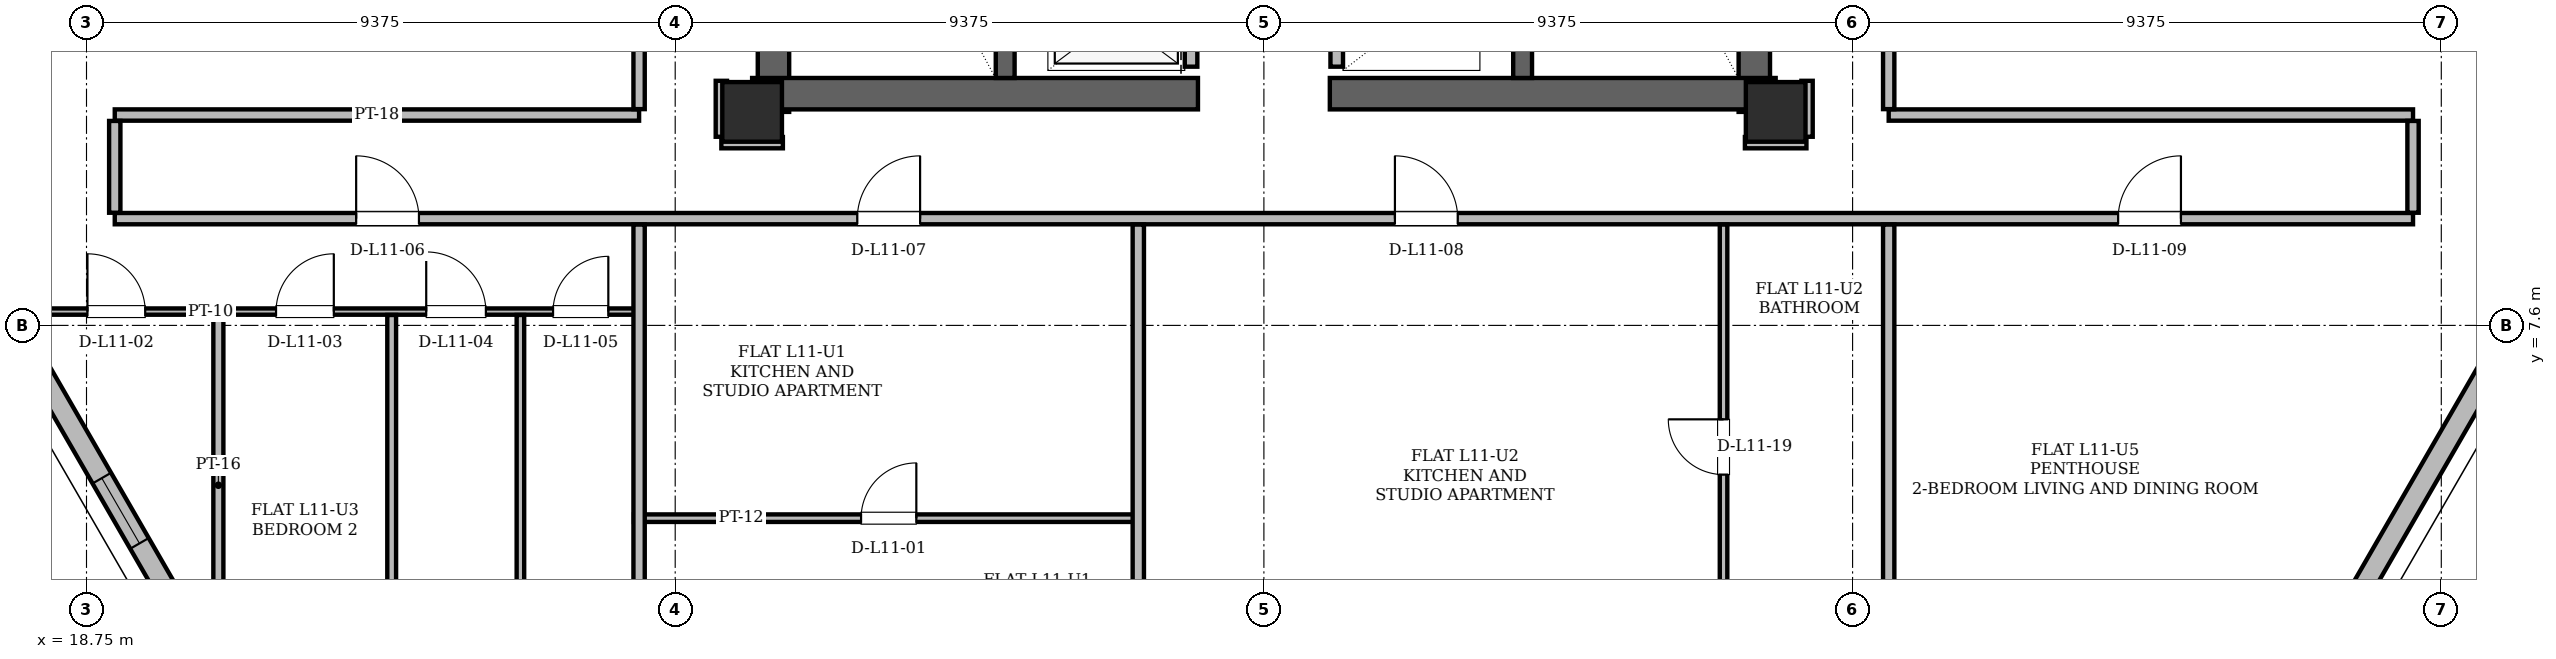
"""IFC4 building model, lengths in metres.
Left out: names, types, materials, properties, quantities, classifications, styles, units other than length and angle.
Written with IfcOpenShell. Run it as: python <this file> out.ifc"""

import sys

from ifc_helpers import new_model, si_unit, direction, frame, frame_2d, origin, origin_2d, place, context, subcontext, project, spatial, rectangle, hollow_rectangle, extrude, element, fill, save


model = new_model("IFC4")
c1 = context("Model", 3, precision=1e-05, world=origin(), true_north=direction((0.0, 1.0)))
c2 = subcontext(c1, "Body", "Model", "MODEL_VIEW")
j1 = project(units=[si_unit("LENGTHUNIT", "METRE"), si_unit("PLANEANGLEUNIT", "RADIAN")], contexts=[c1])
p1 = place(None, origin())
s1 = spatial("IfcSite", under=j1, at=p1, CompositionType="ELEMENT")
p2 = place(p1, origin())
s2 = spatial("IfcBuilding", under=s1, at=p2, CompositionType="ELEMENT")
p3 = place(p2, frame((0.0, 0.0, 45.3)))
s3 = spatial("IfcBuildingStorey", under=s2, at=p3, CompositionType="ELEMENT", Elevation=45.3)
for number, where, z_axis, x_axis in (
    (1, (29.35, 11.0, 0.0), (0.0, 0.0, 1.0), (1.0, 0.0, 0.0)),
    (2, (45.65, 11.0, 0.0), (0.0, 0.0, 1.0), (1.0, 0.0, 0.0)),
):
    element("IfcColumn", number, at=place(p3, frame(where, z_axis=z_axis, x_axis=x_axis)), inside=s3, PredefinedType="COLUMN", context=c2, shape_type="SweptSolid", body=[
        extrude(hollow_rectangle(XDim=0.95, YDim=0.95, WallThickness=0.08, at=origin_2d()), origin(), (0.0, 0.0, 1.0), 3.6),
    ])
for number, where, z_axis, x_axis in (
    (3, (29.69, 11.0, 0.0), (0.0, 0.0, 1.0), (0.0, 1.0, 0.0)),
    (4, (45.31, 11.0, 0.0), (0.0, 0.0, 1.0), (0.0, 1.0, 0.0)),
):
    element("IfcWall", number, at=place(p3, frame(where, z_axis=z_axis, x_axis=x_axis)), inside=s3, PredefinedType="SHEAR", context=c2, shape_type="SweptSolid", body=[
        extrude(rectangle(XDim=13.3, YDim=0.5, at=frame_2d((6.65, 0.0))), origin(), (0.0, 0.0, 1.0), 3.36),
    ])
for number, where, z_axis, x_axis in (
    (5, (29.35, 11.29, 0.0), (0.0, 0.0, 1.0), (1.0, 0.0, 0.0)),
    (6, (38.55, 11.29, 0.0), (0.0, 0.0, 1.0), (1.0, 0.0, 0.0)),
):
    element("IfcWall", number, at=place(p3, frame(where, z_axis=z_axis, x_axis=x_axis)), inside=s3, PredefinedType="SHEAR", context=c2, shape_type="SweptSolid", body=[
        extrude(rectangle(XDim=7.1, YDim=0.5, at=frame_2d((3.55, 0.0))), origin(), (0.0, 0.0, 1.0), 3.36),
    ])
for number, where, z_axis, x_axis in (
    (7, (33.38, 11.54, 0.0), (0.0, 0.0, 1.0), (0.0, 1.0, 0.0)),
    (8, (41.62, 11.54, 0.0), (0.0, 0.0, 1.0), (0.0, 1.0, 0.0)),
):
    element("IfcWall", number, at=place(p3, frame(where, z_axis=z_axis, x_axis=x_axis)), inside=s3, PredefinedType="SHEAR", context=c2, shape_type="SweptSolid", body=[
        extrude(rectangle(XDim=7.62, YDim=0.3, at=frame_2d((3.81, 0.0))), origin(), (0.0, 0.0, 1.0), 3.36),
    ])
p4 = place(p3, frame((13.416, 14.829, 0.0), z_axis=(0.0, 0.0, 1.0), x_axis=(0.499989538455, -0.866031443676, 0.0)))
e9 = element("IfcWall", 9, at=p4, inside=s3, PredefinedType="SOLIDWALL", context=c2, shape_type="SweptSolid", body=[
    extrude(rectangle(XDim=14.955, YDim=0.34, at=frame_2d((7.478, 0.0))), origin(), (0.0, 0.0, 1.0), 2.494),
])
p5 = place(p4, frame((4.918, 0.0, 0.85)))
e10 = element("IfcOpeningElement", 10, at=p5, cuts=e9, PredefinedType="OPENING", context=c2, shape_type="SweptSolid", body=[
    extrude(rectangle(XDim=1.2, YDim=1.48, at=frame_2d((0.6, 0.74))), frame((0.0, 0.17, 0.0), z_axis=(0.0, -1.0, 0.0), x_axis=(1.0, 0.0, 0.0)), (0.0, 0.0, 1.0), 0.34),
])
p6 = place(p4, frame((11.156, 0.0, 0.85)))
e11 = element("IfcOpeningElement", 11, at=p6, cuts=e9, PredefinedType="OPENING", context=c2, shape_type="SweptSolid", body=[
    extrude(rectangle(XDim=1.2, YDim=1.48, at=frame_2d((0.6, 0.74))), frame((0.0, 0.17, 0.0), z_axis=(0.0, -1.0, 0.0), x_axis=(1.0, 0.0, 0.0)), (0.0, 0.0, 1.0), 0.34),
])
p7 = place(p3, frame((54.107, 1.878, 0.0), z_axis=(0.0, 0.0, 1.0), x_axis=(0.499989538455, 0.866031443676, 0.0)))
e12 = element("IfcWall", 12, at=p7, inside=s3, PredefinedType="SOLIDWALL", context=c2, shape_type="SweptSolid", body=[
    extrude(rectangle(XDim=14.955, YDim=0.34, at=frame_2d((7.478, 0.0))), origin(), (0.0, 0.0, 1.0), 2.494),
])
p8 = place(p3, frame((36.34, 11.72, 0.0), z_axis=(0.0, 0.0, 1.0), x_axis=(0.0, 1.0, 0.0)))
e13 = element("IfcWall", 13, at=p8, inside=s3, PredefinedType="PARTITIONING", context=c2, shape_type="SweptSolid", body=[
    extrude(rectangle(XDim=7.6, YDim=0.2, at=frame_2d((3.8, 0.0))), origin(), (0.0, 0.0, 1.0), 3.36),
])
p9 = place(p8, frame((0.255, 0.0, 0.0)))
e14 = element("IfcOpeningElement", 14, at=p9, cuts=e13, PredefinedType="OPENING", context=c2, shape_type="SweptSolid", body=[
    extrude(rectangle(XDim=1.05, YDim=2.15, at=frame_2d((0.525, 1.075))), frame((0.0, 0.1, 0.0), z_axis=(0.0, -1.0, 0.0), x_axis=(1.0, 0.0, 0.0)), (0.0, 0.0, 1.0), 0.2),
])
p10 = place(p8, frame((2.105, 0.0, 0.0)))
e15 = element("IfcOpeningElement", 15, at=p10, cuts=e13, PredefinedType="OPENING", context=c2, shape_type="SweptSolid", body=[
    extrude(rectangle(XDim=1.05, YDim=2.15, at=frame_2d((0.525, 1.075))), frame((0.0, 0.1, 0.0), z_axis=(0.0, -1.0, 0.0), x_axis=(1.0, 0.0, 0.0)), (0.0, 0.0, 1.0), 0.2),
])
p11 = place(p8, frame((3.955, 0.0, 0.0)))
e16 = element("IfcOpeningElement", 16, at=p11, cuts=e13, PredefinedType="OPENING", context=c2, shape_type="SweptSolid", body=[
    extrude(rectangle(XDim=1.05, YDim=2.15, at=frame_2d((0.525, 1.075))), frame((0.0, 0.1, 0.0), z_axis=(0.0, -1.0, 0.0), x_axis=(1.0, 0.0, 0.0)), (0.0, 0.0, 1.0), 0.2),
])
p12 = place(p3, frame((38.66, 11.72, 0.0), z_axis=(0.0, 0.0, 1.0), x_axis=(0.0, 1.0, 0.0)))
e17 = element("IfcWall", 17, at=p12, inside=s3, PredefinedType="PARTITIONING", context=c2, shape_type="SweptSolid", body=[
    extrude(rectangle(XDim=9.1, YDim=0.2, at=frame_2d((4.55, 0.0))), origin(), (0.0, 0.0, 1.0), 3.36),
])
p13 = place(p3, frame((27.468, 4.53, 0.0), z_axis=(0.0, 0.0, 1.0), x_axis=(1.0, 0.0, 0.0)))
e18 = element("IfcWall", 18, at=p13, inside=s3, PredefinedType="PARTITIONING", context=c2, shape_type="SweptSolid", body=[
    extrude(rectangle(XDim=8.114, YDim=0.12, at=frame_2d((4.057, 0.0))), origin(), (0.0, 0.0, 1.0), 2.946),
])
p14 = place(p13, frame((3.617, 0.0, 0.0)))
e19 = element("IfcOpeningElement", 19, at=p14, cuts=e18, PredefinedType="OPENING", context=c2, shape_type="SweptSolid", body=[
    extrude(rectangle(XDim=0.88, YDim=2.08, at=frame_2d((0.44, 1.04))), frame((0.0, 0.06, 0.0), z_axis=(0.0, -1.0, 0.0), x_axis=(1.0, 0.0, 0.0)), (0.0, 0.0, 1.0), 0.12),
])
p15 = place(p3, frame((17.663, 7.82, 0.0), z_axis=(0.0, 0.0, 1.0), x_axis=(1.0, 0.0, 0.0)))
e20 = element("IfcWall", 20, at=p15, inside=s3, PredefinedType="PARTITIONING", context=c2, shape_type="SweptSolid", body=[
    extrude(rectangle(XDim=9.937, YDim=0.1, at=frame_2d((4.969, 0.0))), origin(), (0.0, 0.0, 1.0), 2.738),
])
p16 = place(p15, frame((1.102, 0.0, 0.0)))
e21 = element("IfcOpeningElement", 21, at=p16, cuts=e20, PredefinedType="OPENING", context=c2, shape_type="SweptSolid", body=[
    extrude(rectangle(XDim=0.92, YDim=2.12, at=frame_2d((0.46, 1.06))), frame((0.0, 0.05, 0.0), z_axis=(0.0, -1.0, 0.0), x_axis=(1.0, 0.0, 0.0)), (0.0, 0.0, 1.0), 0.1),
])
p17 = place(p15, frame((4.105, 0.0, 0.0)))
e22 = element("IfcOpeningElement", 22, at=p17, cuts=e20, PredefinedType="OPENING", context=c2, shape_type="SweptSolid", body=[
    extrude(rectangle(XDim=0.92, YDim=2.12, at=frame_2d((0.46, 1.06))), frame((0.0, 0.05, 0.0), z_axis=(0.0, -1.0, 0.0), x_axis=(1.0, 0.0, 0.0)), (0.0, 0.0, 1.0), 0.1),
])
p18 = place(p15, frame((6.497, 0.0, 0.0)))
e23 = element("IfcOpeningElement", 23, at=p18, cuts=e20, PredefinedType="OPENING", context=c2, shape_type="SweptSolid", body=[
    extrude(rectangle(XDim=0.95, YDim=2.1, at=frame_2d((0.475, 1.05))), frame((0.0, 0.05, 0.0), z_axis=(0.0, -1.0, 0.0), x_axis=(1.0, 0.0, 0.0)), (0.0, 0.0, 1.0), 0.1),
])
p19 = place(p15, frame((8.517, 0.0, 0.0)))
e24 = element("IfcOpeningElement", 24, at=p19, cuts=e20, PredefinedType="OPENING", context=c2, shape_type="SweptSolid", body=[
    extrude(rectangle(XDim=0.88, YDim=2.08, at=frame_2d((0.44, 1.04))), frame((0.0, 0.05, 0.0), z_axis=(0.0, -1.0, 0.0), x_axis=(1.0, 0.0, 0.0)), (0.0, 0.0, 1.0), 0.1),
])
p20 = place(p3, frame((19.2, 9.3, 0.0), z_axis=(0.0, 0.0, 1.0), x_axis=(1.0, 0.0, 0.0)))
e25 = element("IfcWall", 25, at=p20, inside=s3, PredefinedType="PARTITIONING", context=c2, shape_type="SweptSolid", body=[
    extrude(rectangle(XDim=36.6, YDim=0.18, at=frame_2d((18.3, 0.0))), origin(), (0.0, 0.0, 1.0), 2.738),
])
p21 = place(p20, frame((3.844, 0.0, 0.0)))
e26 = element("IfcOpeningElement", 26, at=p21, cuts=e25, PredefinedType="OPENING", context=c2, shape_type="SweptSolid", body=[
    extrude(rectangle(XDim=1.0, YDim=2.18, at=frame_2d((0.5, 1.09))), frame((0.0, 0.09, 0.0), z_axis=(0.0, -1.0, 0.0), x_axis=(1.0, 0.0, 0.0)), (0.0, 0.0, 1.0), 0.18),
])
p22 = place(p20, frame((11.825, 0.0, 0.0)))
e27 = element("IfcOpeningElement", 27, at=p22, cuts=e25, PredefinedType="OPENING", context=c2, shape_type="SweptSolid", body=[
    extrude(rectangle(XDim=1.0, YDim=2.18, at=frame_2d((0.5, 1.09))), frame((0.0, 0.09, 0.0), z_axis=(0.0, -1.0, 0.0), x_axis=(1.0, 0.0, 0.0)), (0.0, 0.0, 1.0), 0.18),
])
p23 = place(p20, frame((20.387, 0.0, 0.0)))
e28 = element("IfcOpeningElement", 28, at=p23, cuts=e25, PredefinedType="OPENING", context=c2, shape_type="SweptSolid", body=[
    extrude(rectangle(XDim=1.0, YDim=2.18, at=frame_2d((0.5, 1.09))), frame((0.0, 0.09, 0.0), z_axis=(0.0, -1.0, 0.0), x_axis=(1.0, 0.0, 0.0)), (0.0, 0.0, 1.0), 0.18),
])
p24 = place(p20, frame((31.904, 0.0, 0.0)))
e29 = element("IfcOpeningElement", 29, at=p24, cuts=e25, PredefinedType="OPENING", context=c2, shape_type="SweptSolid", body=[
    extrude(rectangle(XDim=1.0, YDim=2.18, at=frame_2d((0.5, 1.09))), frame((0.0, 0.09, 0.0), z_axis=(0.0, -1.0, 0.0), x_axis=(1.0, 0.0, 0.0)), (0.0, 0.0, 1.0), 0.18),
])
for number, where, z_axis, x_axis in (
    (30, (28.86, 10.51, 0.0), (0.0, 0.0, 1.0), (1.0, 0.0, 0.0)),
    (31, (45.16, 10.51, 0.0), (0.0, 0.0, 1.0), (1.0, 0.0, 0.0)),
):
    element("IfcWall", number, at=place(p3, frame(where, z_axis=z_axis, x_axis=x_axis)), inside=s3, PredefinedType="PARTITIONING", context=c2, shape_type="SweptSolid", body=[
        extrude(rectangle(XDim=0.98, YDim=0.18, at=frame_2d((0.49, 0.0))), origin(), (0.0, 0.0, 1.0), 2.738),
    ])
for number, where, z_axis, x_axis in (
    (32, (19.2, 10.95, 0.0), (0.0, 0.0, 1.0), (1.0, 0.0, 0.0)),
    (33, (47.45, 10.95, 0.0), (0.0, 0.0, 1.0), (1.0, 0.0, 0.0)),
):
    element("IfcWall", number, at=place(p3, frame(where, z_axis=z_axis, x_axis=x_axis)), inside=s3, PredefinedType="PARTITIONING", context=c2, shape_type="SweptSolid", body=[
        extrude(rectangle(XDim=8.35, YDim=0.18, at=frame_2d((4.175, 0.0))), origin(), (0.0, 0.0, 1.0), 3.36),
    ])
p25 = place(p3, frame((19.2, 9.394, 0.0), z_axis=(0.0, 0.0, 1.0), x_axis=(0.0, 1.0, 0.0)))
e34 = element("IfcWall", 34, at=p25, inside=s3, PredefinedType="PARTITIONING", context=c2, shape_type="SweptSolid", body=[
    extrude(rectangle(XDim=1.462, YDim=0.18, at=frame_2d((0.731, 0.0))), origin(), (0.0, 0.0, 1.0), 3.36),
])
p26 = place(p3, frame((20.85, 2.343, 0.0), z_axis=(0.0, 0.0, 1.0), x_axis=(0.0, 1.0, 0.0)))
e35 = element("IfcWall", 35, at=p26, inside=s3, PredefinedType="PARTITIONING", context=c2, shape_type="SweptSolid", body=[
    extrude(rectangle(XDim=5.423, YDim=0.16, at=frame_2d((2.711, 0.0))), origin(), (0.0, 0.0, 1.0), 3.36),
])
p27 = place(p3, frame((23.61, 2.052, 0.0), z_axis=(0.0, 0.0, 1.0), x_axis=(0.0, 1.0, 0.0)))
e36 = element("IfcWall", 36, at=p27, inside=s3, PredefinedType="PARTITIONING", context=c2, shape_type="SweptSolid", body=[
    extrude(rectangle(XDim=5.714, YDim=0.14, at=frame_2d((2.857, 0.0))), origin(), (0.0, 0.0, 1.0), 2.738),
])
p28 = place(p3, frame((25.66, 2.052, 0.0), z_axis=(0.0, 0.0, 1.0), x_axis=(0.0, 1.0, 0.0)))
e37 = element("IfcWall", 37, at=p28, inside=s3, PredefinedType="PARTITIONING", context=c2, shape_type="SweptSolid", body=[
    extrude(rectangle(XDim=5.714, YDim=0.12, at=frame_2d((2.857, 0.0))), origin(), (0.0, 0.0, 1.0), 2.738),
])
p29 = place(p3, frame((27.55, 2.052, 0.0), z_axis=(0.0, 0.0, 1.0), x_axis=(0.0, 1.0, 0.0)))
e38 = element("IfcWall", 38, at=p29, inside=s3, PredefinedType="PARTITIONING", context=c2, shape_type="SweptSolid", body=[
    extrude(rectangle(XDim=7.154, YDim=0.18, at=frame_2d((3.577, 0.0))), origin(), (0.0, 0.0, 1.0), 2.738),
])
p30 = place(p3, frame((27.55, 11.044, 0.0), z_axis=(0.0, 0.0, 1.0), x_axis=(0.0, 1.0, 0.0)))
e39 = element("IfcWall", 39, at=p30, inside=s3, PredefinedType="PARTITIONING", context=c2, shape_type="SweptSolid", body=[
    extrude(rectangle(XDim=27.715, YDim=0.18, at=frame_2d((13.858, 0.0))), origin(), (0.0, 0.0, 1.0), 2.738),
])
p31 = place(p30, frame((8.121, 0.0, 0.0)))
e40 = element("IfcOpeningElement", 40, at=p31, cuts=e39, PredefinedType="OPENING", context=c2, shape_type="SweptSolid", body=[
    extrude(rectangle(XDim=1.0, YDim=2.18, at=frame_2d((0.5, 1.09))), frame((0.0, 0.09, 0.0), z_axis=(0.0, -1.0, 0.0), x_axis=(1.0, 0.0, 0.0)), (0.0, 0.0, 1.0), 0.18),
])
p32 = place(p3, frame((28.86, 10.604, 0.0), z_axis=(0.0, 0.0, 1.0), x_axis=(0.0, 1.0, 0.0)))
e41 = element("IfcWall", 41, at=p32, inside=s3, PredefinedType="PARTITIONING", context=c2, shape_type="SweptSolid", body=[
    extrude(rectangle(XDim=0.891, YDim=0.18, at=frame_2d((0.446, 0.0))), origin(), (0.0, 0.0, 1.0), 2.738),
])
p33 = place(p3, frame((35.5, 2.052, 0.0), z_axis=(0.0, 0.0, 1.0), x_axis=(0.0, 1.0, 0.0)))
e42 = element("IfcWall", 42, at=p33, inside=s3, PredefinedType="PARTITIONING", context=c2, shape_type="SweptSolid", body=[
    extrude(rectangle(XDim=7.154, YDim=0.18, at=frame_2d((3.577, 0.0))), origin(), (0.0, 0.0, 1.0), 3.36),
])
p34 = place(p3, frame((44.82, 2.052, 0.0), z_axis=(0.0, 0.0, 1.0), x_axis=(0.0, 1.0, 0.0)))
e43 = element("IfcWall", 43, at=p34, inside=s3, PredefinedType="PARTITIONING", context=c2, shape_type="SweptSolid", body=[
    extrude(rectangle(XDim=7.154, YDim=0.12, at=frame_2d((3.577, 0.0))), origin(), (0.0, 0.0, 1.0), 2.946),
])
p35 = place(p34, frame((3.172, 0.0, 0.0)))
e44 = element("IfcOpeningElement", 44, at=p35, cuts=e43, PredefinedType="OPENING", context=c2, shape_type="SweptSolid", body=[
    extrude(rectangle(XDim=0.88, YDim=2.08, at=frame_2d((0.44, 1.04))), frame((0.0, 0.06, 0.0), z_axis=(0.0, -1.0, 0.0), x_axis=(1.0, 0.0, 0.0)), (0.0, 0.0, 1.0), 0.12),
])
p36 = place(p3, frame((46.15, 10.604, 0.0), z_axis=(0.0, 0.0, 1.0), x_axis=(0.0, 1.0, 0.0)))
e45 = element("IfcWall", 45, at=p36, inside=s3, PredefinedType="PARTITIONING", context=c2, shape_type="SweptSolid", body=[
    extrude(rectangle(XDim=0.891, YDim=0.18, at=frame_2d((0.446, 0.0))), origin(), (0.0, 0.0, 1.0), 2.738),
])
p37 = place(p3, frame((47.45, 2.052, 0.0), z_axis=(0.0, 0.0, 1.0), x_axis=(0.0, 1.0, 0.0)))
e46 = element("IfcWall", 46, at=p37, inside=s3, PredefinedType="PARTITIONING", context=c2, shape_type="SweptSolid", body=[
    extrude(rectangle(XDim=7.154, YDim=0.18, at=frame_2d((3.577, 0.0))), origin(), (0.0, 0.0, 1.0), 2.738),
])
p38 = place(p3, frame((47.45, 11.044, 0.0), z_axis=(0.0, 0.0, 1.0), x_axis=(0.0, 1.0, 0.0)))
e47 = element("IfcWall", 47, at=p38, inside=s3, PredefinedType="PARTITIONING", context=c2, shape_type="SweptSolid", body=[
    extrude(rectangle(XDim=27.715, YDim=0.18, at=frame_2d((13.858, 0.0))), origin(), (0.0, 0.0, 1.0), 2.738),
])
p39 = place(p38, frame((10.822, 0.0, 0.0)))
e48 = element("IfcOpeningElement", 48, at=p39, cuts=e47, PredefinedType="OPENING", context=c2, shape_type="SweptSolid", body=[
    extrude(rectangle(XDim=1.0, YDim=2.18, at=frame_2d((0.5, 1.09))), frame((0.0, 0.09, 0.0), z_axis=(0.0, -1.0, 0.0), x_axis=(1.0, 0.0, 0.0)), (0.0, 0.0, 1.0), 0.18),
])
p40 = place(p3, frame((55.8, 9.394, 0.0), z_axis=(0.0, 0.0, 1.0), x_axis=(0.0, 1.0, 0.0)))
e49 = element("IfcWall", 49, at=p40, inside=s3, PredefinedType="PARTITIONING", context=c2, shape_type="SweptSolid", body=[
    extrude(rectangle(XDim=1.462, YDim=0.18, at=frame_2d((0.731, 0.0))), origin(), (0.0, 0.0, 1.0), 3.36),
])
p41 = place(p6, origin())
e50 = element("IfcWindow", 50, at=p41, inside=s3, PartitioningType="SINGLE_PANEL", PredefinedType="WINDOW", context=c2, shape_type="SweptSolid", body=[
    extrude(rectangle(XDim=1.2, YDim=1.48, at=frame_2d((0.6, 0.74))), frame((0.0, 0.03, 0.0), z_axis=(0.0, -1.0, 0.0), x_axis=(1.0, 0.0, 0.0)), (0.0, 0.0, 1.0), 0.06),
])
fill(e11, e50)
p42 = place(p14, origin())
e51 = element("IfcDoor", 51, at=p42, inside=s3, OperationType="SINGLE_SWING_RIGHT", PredefinedType="DOOR", context=c2, shape_type="SweptSolid", body=[
    extrude(rectangle(XDim=0.88, YDim=2.08, at=frame_2d((0.44, 1.04))), frame((0.0, 0.025, 0.0), z_axis=(0.0, -1.0, 0.0), x_axis=(1.0, 0.0, 0.0)), (0.0, 0.0, 1.0), 0.05),
])
fill(e19, e51)
p43 = place(p16, origin())
e52 = element("IfcDoor", 52, at=p43, inside=s3, OperationType="SINGLE_SWING_LEFT", PredefinedType="DOOR", context=c2, shape_type="SweptSolid", body=[
    extrude(rectangle(XDim=0.92, YDim=2.12, at=frame_2d((0.46, 1.06))), frame((0.0, 0.025, 0.0), z_axis=(0.0, -1.0, 0.0), x_axis=(1.0, 0.0, 0.0)), (0.0, 0.0, 1.0), 0.05),
])
fill(e21, e52)
p44 = place(p17, origin())
e53 = element("IfcDoor", 53, at=p44, inside=s3, OperationType="SINGLE_SWING_RIGHT", PredefinedType="DOOR", context=c2, shape_type="SweptSolid", body=[
    extrude(rectangle(XDim=0.92, YDim=2.12, at=frame_2d((0.46, 1.06))), frame((0.0, 0.025, 0.0), z_axis=(0.0, -1.0, 0.0), x_axis=(1.0, 0.0, 0.0)), (0.0, 0.0, 1.0), 0.05),
])
fill(e22, e53)
p45 = place(p18, origin())
e54 = element("IfcDoor", 54, at=p45, inside=s3, OperationType="SINGLE_SWING_LEFT", PredefinedType="DOOR", context=c2, shape_type="SweptSolid", body=[
    extrude(rectangle(XDim=0.95, YDim=2.1, at=frame_2d((0.475, 1.05))), frame((0.0, 0.025, 0.0), z_axis=(0.0, -1.0, 0.0), x_axis=(1.0, 0.0, 0.0)), (0.0, 0.0, 1.0), 0.05),
])
fill(e23, e54)
p46 = place(p19, origin())
e55 = element("IfcDoor", 55, at=p46, inside=s3, OperationType="SINGLE_SWING_RIGHT", PredefinedType="DOOR", context=c2, shape_type="SweptSolid", body=[
    extrude(rectangle(XDim=0.88, YDim=2.08, at=frame_2d((0.44, 1.04))), frame((0.0, 0.025, 0.0), z_axis=(0.0, -1.0, 0.0), x_axis=(1.0, 0.0, 0.0)), (0.0, 0.0, 1.0), 0.05),
])
fill(e24, e55)
p47 = place(p21, origin())
e56 = element("IfcDoor", 56, at=p47, inside=s3, OperationType="SINGLE_SWING_LEFT", PredefinedType="DOOR", context=c2, shape_type="SweptSolid", body=[
    extrude(rectangle(XDim=1.0, YDim=2.18, at=frame_2d((0.5, 1.09))), frame((0.0, 0.025, 0.0), z_axis=(0.0, -1.0, 0.0), x_axis=(1.0, 0.0, 0.0)), (0.0, 0.0, 1.0), 0.05),
])
fill(e26, e56)
p48 = place(p22, origin())
e57 = element("IfcDoor", 57, at=p48, inside=s3, OperationType="SINGLE_SWING_RIGHT", PredefinedType="DOOR", context=c2, shape_type="SweptSolid", body=[
    extrude(rectangle(XDim=1.0, YDim=2.18, at=frame_2d((0.5, 1.09))), frame((0.0, 0.025, 0.0), z_axis=(0.0, -1.0, 0.0), x_axis=(1.0, 0.0, 0.0)), (0.0, 0.0, 1.0), 0.05),
])
fill(e27, e57)
p49 = place(p23, origin())
e58 = element("IfcDoor", 58, at=p49, inside=s3, OperationType="SINGLE_SWING_LEFT", PredefinedType="DOOR", context=c2, shape_type="SweptSolid", body=[
    extrude(rectangle(XDim=1.0, YDim=2.18, at=frame_2d((0.5, 1.09))), frame((0.0, 0.025, 0.0), z_axis=(0.0, -1.0, 0.0), x_axis=(1.0, 0.0, 0.0)), (0.0, 0.0, 1.0), 0.05),
])
fill(e28, e58)
p50 = place(p24, origin())
e59 = element("IfcDoor", 59, at=p50, inside=s3, OperationType="SINGLE_SWING_RIGHT", PredefinedType="DOOR", context=c2, shape_type="SweptSolid", body=[
    extrude(rectangle(XDim=1.0, YDim=2.18, at=frame_2d((0.5, 1.09))), frame((0.0, 0.025, 0.0), z_axis=(0.0, -1.0, 0.0), x_axis=(1.0, 0.0, 0.0)), (0.0, 0.0, 1.0), 0.05),
])
fill(e29, e59)
p51 = place(p35, origin())
e60 = element("IfcDoor", 60, at=p51, inside=s3, OperationType="SINGLE_SWING_RIGHT", PredefinedType="DOOR", context=c2, shape_type="SweptSolid", body=[
    extrude(rectangle(XDim=0.88, YDim=2.08, at=frame_2d((0.44, 1.04))), frame((0.0, 0.025, 0.0), z_axis=(0.0, -1.0, 0.0), x_axis=(1.0, 0.0, 0.0)), (0.0, 0.0, 1.0), 0.05),
])
fill(e44, e60)
save(model, sys.argv[1])
